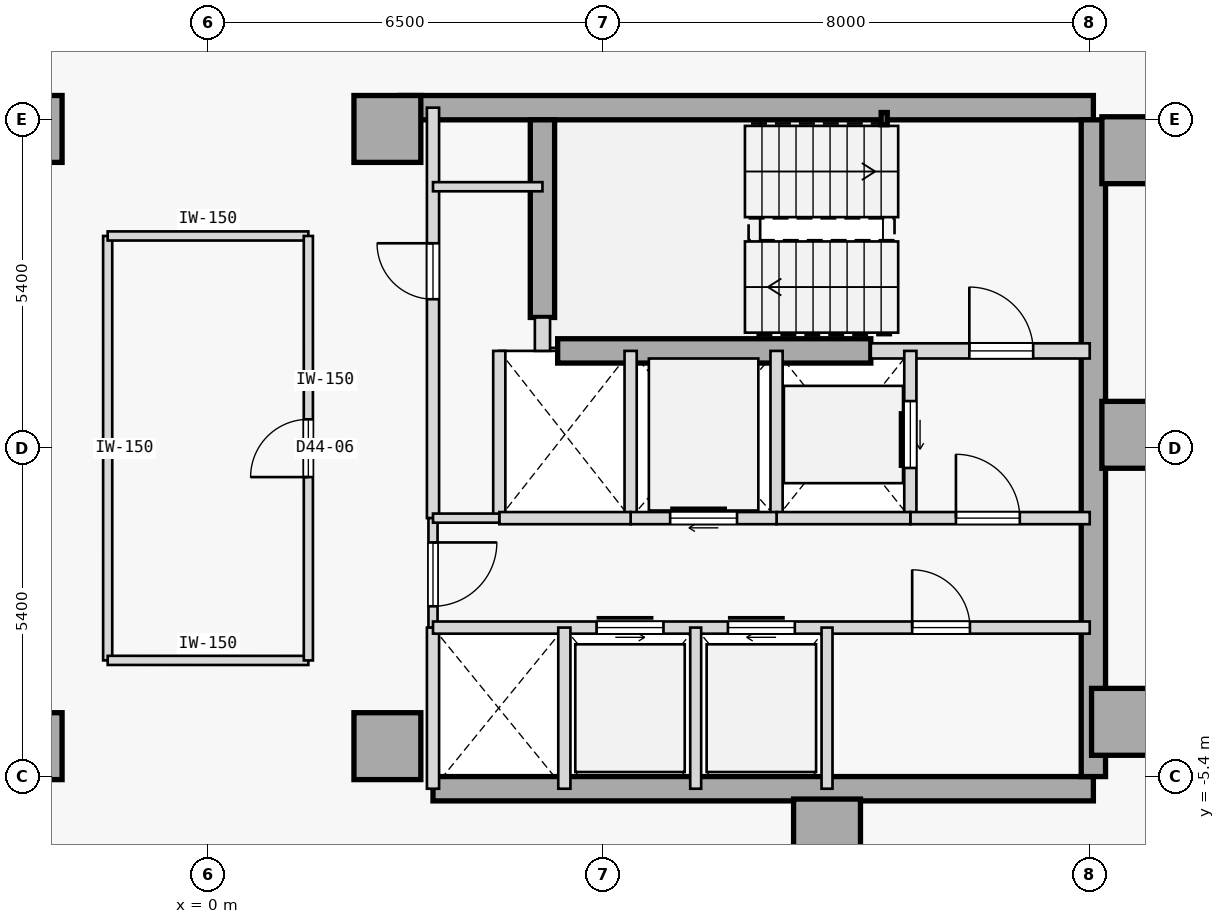
"""IFC4 building model, lengths in metres.
Left out: names, types, materials, properties, quantities, classifications, styles, units other than length and angle.
Written with IfcOpenShell. Run it as: python <this file> out.ifc"""

import sys

from ifc_helpers import new_model, si_unit, direction, frame, frame_2d, origin, origin_2d, place, context, subcontext, project, spatial, rectangle, hollow_rectangle, extrude, element, fill, save


model = new_model("IFC4")
c1 = context("Model", 3, precision=1e-05, world=origin(), true_north=direction((0.0, 1.0)))
c2 = subcontext(c1, "Body", "Model", "MODEL_VIEW")
j1 = project(units=[si_unit("LENGTHUNIT", "METRE"), si_unit("PLANEANGLEUNIT", "RADIAN")], contexts=[c1])
p1 = place(None, origin())
s1 = spatial("IfcSite", under=j1, at=p1, CompositionType="ELEMENT")
p2 = place(p1, origin())
s2 = spatial("IfcBuilding", under=s1, at=p2, CompositionType="ELEMENT")
p3 = place(p2, frame((0.0, 0.0, 171.8)))
s3 = spatial("IfcBuildingStorey", under=s2, at=p3, CompositionType="ELEMENT", Elevation=171.8)
for number, where, z_axis, x_axis in (
    (1, (-2.95, -4.9, 0.0), (0.0, 0.0, 1.0), (1.0, 0.0, 0.0)),
    (2, (-2.95, 5.25, 0.0), (0.0, 0.0, 1.0), (1.0, 0.0, 0.0)),
    (3, (15.25, 4.9, 0.0), (0.0, 0.0, 1.0), (1.0, 0.0, 0.0)),
    (4, (15.25, 0.22, 0.0), (0.0, 0.0, 1.0), (1.0, 0.0, 0.0)),
    (5, (15.08, -4.5, 0.0), (0.0, 0.0, 1.0), (1.0, 0.0, 0.0)),
    (6, (10.18, -6.32, 0.0), (0.0, 0.0, 1.0), (1.0, 0.0, 0.0)),
    (7, (2.95, -4.9, 0.0), (0.0, 0.0, 1.0), (1.0, 0.0, 0.0)),
    (8, (2.95, 5.25, 0.0), (0.0, 0.0, 1.0), (1.0, 0.0, 0.0)),
):
    element("IfcColumn", number, at=place(p3, frame(where, z_axis=z_axis, x_axis=x_axis)), inside=s3, PredefinedType="COLUMN", context=c2, shape_type="SweptSolid", body=[
        extrude(rectangle(XDim=1.1, YDim=1.1, at=origin_2d()), origin(), (0.0, 0.0, 1.0), 3.4),
    ])
p4 = place(p3, frame((3.15, 5.6, 0.0), z_axis=(0.0, 0.0, 1.0), x_axis=(1.0, 0.0, 0.0)))
e9 = element("IfcWall", 9, at=p4, inside=s3, PredefinedType="SHEAR", context=c2, shape_type="SweptSolid", body=[
    extrude(rectangle(XDim=11.41, YDim=0.4, at=frame_2d((5.705, 0.0))), origin(), (0.0, 0.0, 1.0), 3.175),
])
p5 = place(p3, frame((3.7, -5.6, 0.0), z_axis=(0.0, 0.0, 1.0), x_axis=(1.0, 0.0, 0.0)))
e10 = element("IfcWall", 10, at=p5, inside=s3, PredefinedType="SHEAR", context=c2, shape_type="SweptSolid", body=[
    extrude(rectangle(XDim=10.86, YDim=0.4, at=frame_2d((5.43, 0.0))), origin(), (0.0, 0.0, 1.0), 3.175),
])
p6 = place(p3, frame((14.56, -5.4, 0.0), z_axis=(0.0, 0.0, 1.0), x_axis=(0.0, 1.0, 0.0)))
e11 = element("IfcWall", 11, at=p6, inside=s3, PredefinedType="SHEAR", context=c2, shape_type="SweptSolid", body=[
    extrude(rectangle(XDim=10.8, YDim=0.4, at=frame_2d((5.4, 0.0))), origin(), (0.0, 0.0, 1.0), 3.175),
])
p7 = place(p3, frame((5.5, 2.15, 0.0), z_axis=(0.0, 0.0, 1.0), x_axis=(0.0, 1.0, 0.0)))
e12 = element("IfcWall", 12, at=p7, inside=s3, PredefinedType="SHEAR", context=c2, shape_type="SweptSolid", body=[
    extrude(rectangle(XDim=3.25, YDim=0.4, at=frame_2d((1.625, 0.0))), origin(), (0.0, 0.0, 1.0), 3.175),
])
p8 = place(p3, frame((5.75, 1.6, 0.0), z_axis=(0.0, 0.0, 1.0), x_axis=(1.0, 0.0, 0.0)))
e13 = element("IfcWall", 13, at=p8, inside=s3, PredefinedType="SHEAR", context=c2, shape_type="SweptSolid", body=[
    extrude(rectangle(XDim=5.15, YDim=0.4, at=frame_2d((2.575, 0.0))), origin(), (0.0, 0.0, 1.0), 3.175),
])
p9 = place(p3, frame((11.12, 5.42, 0.0), z_axis=(0.0, 0.0, 1.0), x_axis=(1.0, 0.0, 0.0)))
e14 = element("IfcColumn", 14, at=p9, inside=s3, PredefinedType="COLUMN", context=c2, shape_type="SweptSolid", body=[
    extrude(hollow_rectangle(XDim=0.1, YDim=0.2, WallThickness=0.008, at=origin_2d()), origin(), (0.0, 0.0, 1.0), 3.4),
])
p10 = place(p3, frame((10.9, 1.6, 0.0), z_axis=(0.0, 0.0, 1.0), x_axis=(1.0, 0.0, 0.0)))
e15 = element("IfcWall", 15, at=p10, inside=s3, PredefinedType="STANDARD", context=c2, shape_type="SweptSolid", body=[
    extrude(rectangle(XDim=3.6, YDim=0.25, at=frame_2d((1.8, 0.0))), origin(), (0.0, 0.0, 1.0), 3.175),
])
p11 = place(p10, frame((1.62, 0.0, 0.0)))
e16 = element("IfcOpeningElement", 16, at=p11, cuts=e15, PredefinedType="OPENING", context=c2, shape_type="SweptSolid", body=[
    extrude(rectangle(XDim=1.05, YDim=2.15, at=frame_2d((0.525, 1.075))), frame((0.0, 0.135, 0.0), z_axis=(0.0, -1.0, 0.0), x_axis=(1.0, 0.0, 0.0)), (0.0, 0.0, 1.0), 0.27),
])
p12 = place(p3, frame((5.5, 1.6, 0.0), z_axis=(0.0, 0.0, 1.0), x_axis=(0.0, 1.0, 0.0)))
e17 = element("IfcWall", 17, at=p12, inside=s3, PredefinedType="STANDARD", context=c2, shape_type="SweptSolid", body=[
    extrude(rectangle(XDim=0.55, YDim=0.25, at=frame_2d((0.275, 0.0))), origin(), (0.0, 0.0, 1.0), 3.175),
])
p13 = place(p3, frame((3.7, -1.15, 0.0), z_axis=(0.0, 0.0, 1.0), x_axis=(0.0, 1.0, 0.0)))
e18 = element("IfcWall", 18, at=p13, inside=s3, PredefinedType="STANDARD", context=c2, shape_type="SweptSolid", body=[
    extrude(rectangle(XDim=6.75, YDim=0.2, at=frame_2d((3.375, 0.0))), origin(), (0.0, 0.0, 1.0), 3.175),
])
p14 = place(p13, frame((3.6, 0.0, 0.0)))
e19 = element("IfcOpeningElement", 19, at=p14, cuts=e18, PredefinedType="OPENING", context=c2, shape_type="SweptSolid", body=[
    extrude(rectangle(XDim=0.92, YDim=2.15, at=frame_2d((0.46, 1.075))), frame((0.0, 0.11, 0.0), z_axis=(0.0, -1.0, 0.0), x_axis=(1.0, 0.0, 0.0)), (0.0, 0.0, 1.0), 0.22),
])
p15 = place(p3, frame((3.7, -2.95, 0.0), z_axis=(0.0, 0.0, 1.0), x_axis=(0.0, 1.0, 0.0)))
e20 = element("IfcWall", 20, at=p15, inside=s3, PredefinedType="PARTITIONING", context=c2, shape_type="SweptSolid", body=[
    extrude(rectangle(XDim=1.8, YDim=0.15, at=frame_2d((0.9, 0.0))), origin(), (0.0, 0.0, 1.0), 3.175),
])
p16 = place(p15, frame((0.35, 0.0, 0.0)))
e21 = element("IfcOpeningElement", 21, at=p16, cuts=e20, PredefinedType="OPENING", context=c2, shape_type="SweptSolid", body=[
    extrude(rectangle(XDim=1.05, YDim=2.18, at=frame_2d((0.525, 1.09))), frame((0.0, 0.085, 0.0), z_axis=(0.0, -1.0, 0.0), x_axis=(1.0, 0.0, 0.0)), (0.0, 0.0, 1.0), 0.17),
])
p17 = place(p3, frame((3.7, -5.6, 0.0), z_axis=(0.0, 0.0, 1.0), x_axis=(0.0, 1.0, 0.0)))
e22 = element("IfcWall", 22, at=p17, inside=s3, PredefinedType="STANDARD", context=c2, shape_type="SweptSolid", body=[
    extrude(rectangle(XDim=2.65, YDim=0.2, at=frame_2d((1.325, 0.0))), origin(), (0.0, 0.0, 1.0), 3.175),
])
p18 = place(p3, frame((11.55, -1.15, 0.0), z_axis=(0.0, 0.0, 1.0), x_axis=(0.0, 1.0, 0.0)))
e23 = element("IfcWall", 23, at=p18, inside=s3, PredefinedType="STANDARD", context=c2, shape_type="SweptSolid", body=[
    extrude(rectangle(XDim=2.75, YDim=0.2, at=frame_2d((1.375, 0.0))), origin(), (0.0, 0.0, 1.0), 3.175),
])
p19 = place(p18, frame((0.825, 0.0, 0.0)))
e24 = element("IfcOpeningElement", 24, at=p19, cuts=e23, PredefinedType="OPENING", context=c2, shape_type="SweptSolid", body=[
    extrude(rectangle(XDim=1.1, YDim=2.15, at=frame_2d((0.55, 1.075))), frame((0.0, 0.11, 0.0), z_axis=(0.0, -1.0, 0.0), x_axis=(1.0, 0.0, 0.0)), (0.0, 0.0, 1.0), 0.22),
])
p20 = place(p3, frame((9.35, -1.15, 0.0), z_axis=(0.0, 0.0, 1.0), x_axis=(0.0, 1.0, 0.0)))
e25 = element("IfcWall", 25, at=p20, inside=s3, PredefinedType="STANDARD", context=c2, shape_type="SweptSolid", body=[
    extrude(rectangle(XDim=2.75, YDim=0.2, at=frame_2d((1.375, 0.0))), origin(), (0.0, 0.0, 1.0), 3.175),
])
p21 = place(p3, frame((11.55, -1.15, 0.0), z_axis=(0.0, 0.0, 1.0), x_axis=(1.0, 0.0, 0.0)))
e26 = element("IfcWall", 26, at=p21, inside=s3, PredefinedType="STANDARD", context=c2, shape_type="SweptSolid", body=[
    extrude(rectangle(XDim=2.95, YDim=0.2, at=frame_2d((1.475, 0.0))), origin(), (0.0, 0.0, 1.0), 3.175),
])
p22 = place(p21, frame((0.75, 0.0, 0.0)))
e27 = element("IfcOpeningElement", 27, at=p22, cuts=e26, PredefinedType="OPENING", context=c2, shape_type="SweptSolid", body=[
    extrude(rectangle(XDim=1.05, YDim=2.18, at=frame_2d((0.525, 1.09))), frame((0.0, 0.11, 0.0), z_axis=(0.0, -1.0, 0.0), x_axis=(1.0, 0.0, 0.0)), (0.0, 0.0, 1.0), 0.22),
])
p23 = place(p3, frame((9.35, -1.15, 0.0), z_axis=(0.0, 0.0, 1.0), x_axis=(1.0, 0.0, 0.0)))
e28 = element("IfcWall", 28, at=p23, inside=s3, PredefinedType="STANDARD", context=c2, shape_type="SweptSolid", body=[
    extrude(rectangle(XDim=2.2, YDim=0.2, at=frame_2d((1.1, 0.0))), origin(), (0.0, 0.0, 1.0), 3.175),
])
p24 = place(p3, frame((6.95, -1.15, 0.0), z_axis=(0.0, 0.0, 1.0), x_axis=(0.0, 1.0, 0.0)))
e29 = element("IfcWall", 29, at=p24, inside=s3, PredefinedType="STANDARD", context=c2, shape_type="SweptSolid", body=[
    extrude(rectangle(XDim=2.75, YDim=0.2, at=frame_2d((1.375, 0.0))), origin(), (0.0, 0.0, 1.0), 3.175),
])
p25 = place(p3, frame((6.95, -1.15, 0.0), z_axis=(0.0, 0.0, 1.0), x_axis=(1.0, 0.0, 0.0)))
e30 = element("IfcWall", 30, at=p25, inside=s3, PredefinedType="STANDARD", context=c2, shape_type="SweptSolid", body=[
    extrude(rectangle(XDim=2.4, YDim=0.2, at=frame_2d((1.2, 0.0))), origin(), (0.0, 0.0, 1.0), 3.175),
])
p26 = place(p25, frame((0.65, 0.0, 0.0)))
e31 = element("IfcOpeningElement", 31, at=p26, cuts=e30, PredefinedType="OPENING", context=c2, shape_type="SweptSolid", body=[
    extrude(rectangle(XDim=1.1, YDim=2.15, at=frame_2d((0.55, 1.075))), frame((0.0, 0.11, 0.0), z_axis=(0.0, -1.0, 0.0), x_axis=(1.0, 0.0, 0.0)), (0.0, 0.0, 1.0), 0.22),
])
p27 = place(p3, frame((4.79, -1.15, 0.0), z_axis=(0.0, 0.0, 1.0), x_axis=(0.0, 1.0, 0.0)))
e32 = element("IfcWall", 32, at=p27, inside=s3, PredefinedType="STANDARD", context=c2, shape_type="SweptSolid", body=[
    extrude(rectangle(XDim=2.75, YDim=0.2, at=frame_2d((1.375, 0.0))), origin(), (0.0, 0.0, 1.0), 3.175),
])
p28 = place(p3, frame((4.79, -1.15, 0.0), z_axis=(0.0, 0.0, 1.0), x_axis=(1.0, 0.0, 0.0)))
e33 = element("IfcWall", 33, at=p28, inside=s3, PredefinedType="STANDARD", context=c2, shape_type="SweptSolid", body=[
    extrude(rectangle(XDim=2.16, YDim=0.2, at=frame_2d((1.08, 0.0))), origin(), (0.0, 0.0, 1.0), 3.175),
])
p29 = place(p3, frame((3.7, -1.15, 0.0), z_axis=(0.0, 0.0, 1.0), x_axis=(1.0, 0.0, 0.0)))
e34 = element("IfcWall", 34, at=p29, inside=s3, PredefinedType="PARTITIONING", context=c2, shape_type="SweptSolid", body=[
    extrude(rectangle(XDim=1.09, YDim=0.15, at=frame_2d((0.545, 0.0))), origin(), (0.0, 0.0, 1.0), 3.175),
])
p30 = place(p3, frame((3.7, -2.95, 0.0), z_axis=(0.0, 0.0, 1.0), x_axis=(1.0, 0.0, 0.0)))
e35 = element("IfcWall", 35, at=p30, inside=s3, PredefinedType="STANDARD", context=c2, shape_type="SweptSolid", body=[
    extrude(rectangle(XDim=10.8, YDim=0.2, at=frame_2d((5.4, 0.0))), origin(), (0.0, 0.0, 1.0), 3.175),
])
p31 = place(p30, frame((2.69, 0.0, 0.0)))
e36 = element("IfcOpeningElement", 36, at=p31, cuts=e35, PredefinedType="OPENING", context=c2, shape_type="SweptSolid", body=[
    extrude(rectangle(XDim=1.1, YDim=2.15, at=frame_2d((0.55, 1.075))), frame((0.0, 0.11, 0.0), z_axis=(0.0, -1.0, 0.0), x_axis=(1.0, 0.0, 0.0)), (0.0, 0.0, 1.0), 0.22),
])
p32 = place(p30, frame((4.85, 0.0, 0.0)))
e37 = element("IfcOpeningElement", 37, at=p32, cuts=e35, PredefinedType="OPENING", context=c2, shape_type="SweptSolid", body=[
    extrude(rectangle(XDim=1.1, YDim=2.15, at=frame_2d((0.55, 1.075))), frame((0.0, 0.11, 0.0), z_axis=(0.0, -1.0, 0.0), x_axis=(1.0, 0.0, 0.0)), (0.0, 0.0, 1.0), 0.22),
])
p33 = place(p30, frame((7.88, 0.0, 0.0)))
e38 = element("IfcOpeningElement", 38, at=p33, cuts=e35, PredefinedType="OPENING", context=c2, shape_type="SweptSolid", body=[
    extrude(rectangle(XDim=0.95, YDim=2.15, at=frame_2d((0.475, 1.075))), frame((0.0, 0.11, 0.0), z_axis=(0.0, -1.0, 0.0), x_axis=(1.0, 0.0, 0.0)), (0.0, 0.0, 1.0), 0.22),
])
p34 = place(p3, frame((5.86, -5.6, 0.0), z_axis=(0.0, 0.0, 1.0), x_axis=(0.0, 1.0, 0.0)))
e39 = element("IfcWall", 39, at=p34, inside=s3, PredefinedType="STANDARD", context=c2, shape_type="SweptSolid", body=[
    extrude(rectangle(XDim=2.65, YDim=0.2, at=frame_2d((1.325, 0.0))), origin(), (0.0, 0.0, 1.0), 3.175),
])
for number, where, z_axis, x_axis in (
    (40, (10.18, -5.6, 0.0), (0.0, 0.0, 1.0), (0.0, 1.0, 0.0)),
    (41, (8.02, -5.6, 0.0), (0.0, 0.0, 1.0), (0.0, 1.0, 0.0)),
):
    element("IfcWall", number, at=place(p3, frame(where, z_axis=z_axis, x_axis=x_axis)), inside=s3, PredefinedType="STANDARD", context=c2, shape_type="SweptSolid", body=[
        extrude(rectangle(XDim=2.65, YDim=0.18, at=frame_2d((1.325, 0.0))), origin(), (0.0, 0.0, 1.0), 3.175),
    ])
p35 = place(p3, frame((3.7, 4.3, 0.0), z_axis=(0.0, 0.0, 1.0), x_axis=(1.0, 0.0, 0.0)))
e42 = element("IfcWall", 42, at=p35, inside=s3, PredefinedType="PARTITIONING", context=c2, shape_type="SweptSolid", body=[
    extrude(rectangle(XDim=1.8, YDim=0.15, at=frame_2d((0.9, 0.0))), origin(), (0.0, 0.0, 1.0), 3.175),
])
p36 = place(p3, frame((-1.65, -3.49, 0.0), z_axis=(0.0, 0.0, 1.0), x_axis=(-3.4979712e-05, 0.999999999388, 0.0)))
e43 = element("IfcWall", 43, at=p36, inside=s3, PredefinedType="PARTITIONING", context=c2, shape_type="SweptSolid", body=[
    extrude(rectangle(XDim=6.979, YDim=0.15, at=frame_2d((3.49, 0.0))), origin(), (0.0, 0.0, 1.0), 3.175),
])
p37 = place(p3, frame((-1.65, -3.49, 0.0), z_axis=(0.0, 0.0, 1.0), x_axis=(0.999999975374, -0.000221926315, 0.0)))
e44 = element("IfcWall", 44, at=p37, inside=s3, PredefinedType="PARTITIONING", context=c2, shape_type="SweptSolid", body=[
    extrude(rectangle(XDim=3.3, YDim=0.15, at=frame_2d((1.65, 0.0))), origin(), (0.0, 0.0, 1.0), 3.175),
])
p38 = place(p3, frame((-1.65, 3.49, 0.0), z_axis=(0.0, 0.0, 1.0), x_axis=(1.0, 0.0, 0.0)))
e45 = element("IfcWall", 45, at=p38, inside=s3, PredefinedType="PARTITIONING", context=c2, shape_type="SweptSolid", body=[
    extrude(rectangle(XDim=3.3, YDim=0.15, at=frame_2d((1.65, 0.0))), origin(), (0.0, 0.0, 1.0), 3.175),
])
p39 = place(p3, frame((1.65, -3.49, 0.0), z_axis=(0.0, 0.0, 1.0), x_axis=(-6.9952083e-05, 0.999999997553, 0.0)))
e46 = element("IfcWall", 46, at=p39, inside=s3, PredefinedType="PARTITIONING", context=c2, shape_type="SweptSolid", body=[
    extrude(rectangle(XDim=6.98, YDim=0.15, at=frame_2d((3.49, 0.0))), origin(), (0.0, 0.0, 1.0), 3.175),
])
p40 = place(p39, frame((3.015, 0.0, 0.0)))
e47 = element("IfcOpeningElement", 47, at=p40, cuts=e46, PredefinedType="OPENING", context=c2, shape_type="SweptSolid", body=[
    extrude(rectangle(XDim=0.95, YDim=2.15, at=frame_2d((0.475, 1.075))), frame((0.0, 0.085, 0.0), z_axis=(0.0, -1.0, 0.0), x_axis=(1.0, 0.0, 0.0)), (0.0, 0.0, 1.0), 0.17),
])
p41 = place(p11, origin())
e48 = element("IfcDoor", 48, at=p41, inside=s3, OperationType="SINGLE_SWING_LEFT", PredefinedType="DOOR", context=c2, shape_type="SweptSolid", body=[
    extrude(rectangle(XDim=1.05, YDim=2.15, at=frame_2d((0.525, 1.075))), frame((0.0, 0.025, 0.0), z_axis=(0.0, -1.0, 0.0), x_axis=(1.0, 0.0, 0.0)), (0.0, 0.0, 1.0), 0.05),
])
fill(e16, e48)
p42 = place(p22, origin())
e49 = element("IfcDoor", 49, at=p42, inside=s3, OperationType="SINGLE_SWING_LEFT", PredefinedType="DOOR", context=c2, shape_type="SweptSolid", body=[
    extrude(rectangle(XDim=1.05, YDim=2.18, at=frame_2d((0.525, 1.09))), frame((0.0, 0.025, 0.0), z_axis=(0.0, -1.0, 0.0), x_axis=(1.0, 0.0, 0.0)), (0.0, 0.0, 1.0), 0.05),
])
fill(e27, e49)
p43 = place(p16, frame((1.05, 0.0, 0.0), z_axis=(0.0, 0.0, 1.0), x_axis=(-1.0, 0.0, 0.0)))
e50 = element("IfcDoor", 50, at=p43, inside=s3, OperationType="SINGLE_SWING_RIGHT", PredefinedType="DOOR", context=c2, shape_type="SweptSolid", body=[
    extrude(rectangle(XDim=1.05, YDim=2.18, at=frame_2d((0.525, 1.09))), frame((0.0, 0.025, 0.0), z_axis=(0.0, -1.0, 0.0), x_axis=(1.0, 0.0, 0.0)), (0.0, 0.0, 1.0), 0.05),
])
fill(e21, e50)
p44 = place(p19, origin())
e51 = element("IfcDoor", 51, at=p44, inside=s3, OperationType="SLIDING_TO_RIGHT", PredefinedType="DOOR", context=c2, shape_type="SweptSolid", body=[
    extrude(rectangle(XDim=1.1, YDim=2.15, at=frame_2d((0.55, 1.075))), frame((0.0, 0.025, 0.0), z_axis=(0.0, -1.0, 0.0), x_axis=(1.0, 0.0, 0.0)), (0.0, 0.0, 1.0), 0.05),
])
fill(e24, e51)
p45 = place(p26, origin())
e52 = element("IfcDoor", 52, at=p45, inside=s3, OperationType="SLIDING_TO_RIGHT", PredefinedType="DOOR", context=c2, shape_type="SweptSolid", body=[
    extrude(rectangle(XDim=1.1, YDim=2.15, at=frame_2d((0.55, 1.075))), frame((0.0, 0.025, 0.0), z_axis=(0.0, -1.0, 0.0), x_axis=(1.0, 0.0, 0.0)), (0.0, 0.0, 1.0), 0.05),
])
fill(e31, e52)
p46 = place(p31, origin())
e53 = element("IfcDoor", 53, at=p46, inside=s3, OperationType="SLIDING_TO_LEFT", PredefinedType="DOOR", context=c2, shape_type="SweptSolid", body=[
    extrude(rectangle(XDim=1.1, YDim=2.15, at=frame_2d((0.55, 1.075))), frame((0.0, 0.025, 0.0), z_axis=(0.0, -1.0, 0.0), x_axis=(1.0, 0.0, 0.0)), (0.0, 0.0, 1.0), 0.05),
])
fill(e36, e53)
p47 = place(p32, origin())
e54 = element("IfcDoor", 54, at=p47, inside=s3, OperationType="SLIDING_TO_RIGHT", PredefinedType="DOOR", context=c2, shape_type="SweptSolid", body=[
    extrude(rectangle(XDim=1.1, YDim=2.15, at=frame_2d((0.55, 1.075))), frame((0.0, 0.025, 0.0), z_axis=(0.0, -1.0, 0.0), x_axis=(1.0, 0.0, 0.0)), (0.0, 0.0, 1.0), 0.05),
])
fill(e37, e54)
p48 = place(p33, origin())
e55 = element("IfcDoor", 55, at=p48, inside=s3, OperationType="SINGLE_SWING_LEFT", PredefinedType="DOOR", context=c2, shape_type="SweptSolid", body=[
    extrude(rectangle(XDim=0.95, YDim=2.15, at=frame_2d((0.475, 1.075))), frame((0.0, 0.025, 0.0), z_axis=(0.0, -1.0, 0.0), x_axis=(1.0, 0.0, 0.0)), (0.0, 0.0, 1.0), 0.05),
])
fill(e38, e55)
p49 = place(p14, origin())
e56 = element("IfcDoor", 56, at=p49, inside=s3, OperationType="SINGLE_SWING_RIGHT", PredefinedType="DOOR", context=c2, shape_type="SweptSolid", body=[
    extrude(rectangle(XDim=0.92, YDim=2.15, at=frame_2d((0.46, 1.075))), frame((0.0, 0.025, 0.0), z_axis=(0.0, -1.0, 0.0), x_axis=(1.0, 0.0, 0.0)), (0.0, 0.0, 1.0), 0.05),
])
fill(e19, e56)
p50 = place(p40, origin())
e57 = element("IfcDoor", 57, at=p50, inside=s3, OperationType="SINGLE_SWING_LEFT", PredefinedType="DOOR", context=c2, shape_type="SweptSolid", body=[
    extrude(rectangle(XDim=0.95, YDim=2.15, at=frame_2d((0.475, 1.075))), frame((0.0, 0.025, 0.0), z_axis=(0.0, -1.0, 0.0), x_axis=(1.0, 0.0, 0.0)), (0.0, 0.0, 1.0), 0.05),
])
fill(e47, e57)
save(model, sys.argv[1])
